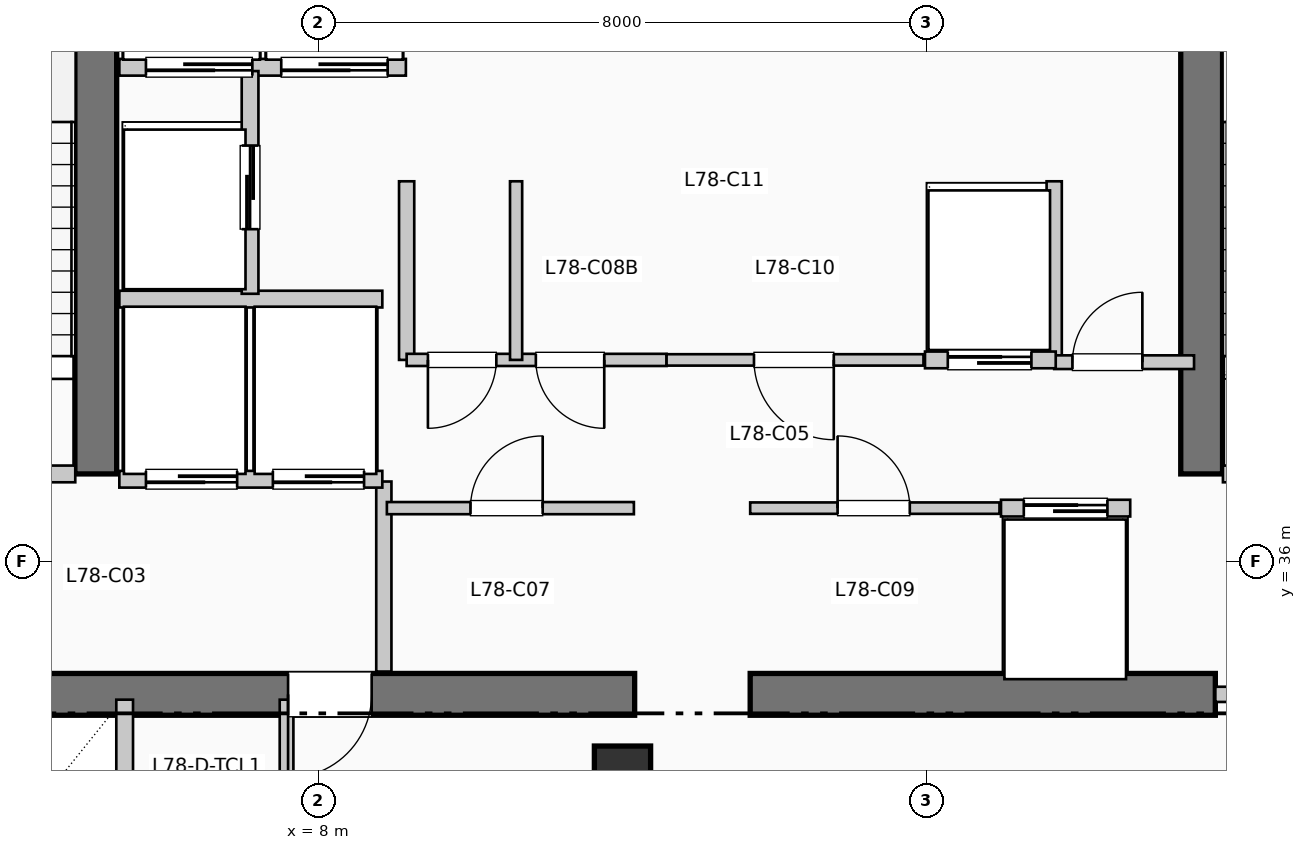
"""IFC4 building model, lengths in metres.
Left out: names, types, materials, properties, quantities, classifications, styles, units other than length and angle.
Written with IfcOpenShell. Run it as: python <this file> out.ifc"""

import sys

from ifc_helpers import new_model, si_unit, direction, frame, frame_2d, origin, origin_2d, place, context, subcontext, project, spatial, rectangle, extrude, element, fill, save


model = new_model("IFC4")
c1 = context("Model", 3, precision=1e-05, world=origin(), true_north=direction((0.0, 1.0)))
c2 = subcontext(c1, "Body", "Model", "MODEL_VIEW")
j1 = project(units=[si_unit("LENGTHUNIT", "METRE"), si_unit("PLANEANGLEUNIT", "RADIAN")], contexts=[c1])
p1 = place(None, origin())
s1 = spatial("IfcSite", under=j1, at=p1, CompositionType="ELEMENT")
p2 = place(p1, origin())
s2 = spatial("IfcBuilding", under=s1, at=p2, CompositionType="ELEMENT")
p3 = place(p2, frame((0.0, 0.0, 319.77)))
s3 = spatial("IfcBuildingStorey", under=s2, at=p3, CompositionType="ELEMENT", Elevation=319.77)
p4 = place(p3, frame((1.45, 34.25, 0.0), z_axis=(0.0, 0.0, 1.0), x_axis=(1.0, 0.0, 0.0)))
e1 = element("IfcWall", 1, at=p4, inside=s3, PredefinedType="SHEAR", context=c2, shape_type="SweptSolid", body=[
    extrude(rectangle(XDim=10.71, YDim=0.55, at=frame_2d((5.355, 0.0))), origin(), (0.0, 0.0, 1.0), 3.96),
])
p5 = place(p4, frame((7.25, 0.0, 0.0), z_axis=(0.0, 0.0, 1.0), x_axis=(-1.0, 0.0, 0.0)))
e2 = element("IfcOpeningElement", 2, at=p5, cuts=e1, PredefinedType="OPENING", context=c2, shape_type="SweptSolid", body=[
    extrude(rectangle(XDim=1.1, YDim=2.15, at=frame_2d((0.55, 1.075))), frame((0.0, 0.285, 0.0), z_axis=(0.0, -1.0, 0.0), x_axis=(1.0, 0.0, 0.0)), (0.0, 0.0, 1.0), 0.57),
])
p6 = place(p3, frame((13.68, 34.25, 0.0), z_axis=(0.0, 0.0, 1.0), x_axis=(1.0, 0.0, 0.0)))
e3 = element("IfcWall", 3, at=p6, inside=s3, PredefinedType="SHEAR", context=c2, shape_type="SweptSolid", body=[
    extrude(rectangle(XDim=6.12, YDim=0.55, at=frame_2d((3.06, 0.0))), origin(), (0.0, 0.0, 1.0), 3.96),
])
for number, where, z_axis, x_axis in (
    (4, (5.07, 37.15, 0.0), (0.0, 0.0, 1.0), (0.0, 1.0, 0.0)),
    (5, (19.62, 37.15, 0.0), (0.0, 0.0, 1.0), (0.0, 1.0, 0.0)),
):
    element("IfcWall", number, at=place(p3, frame(where, z_axis=z_axis, x_axis=x_axis)), inside=s3, PredefinedType="SHEAR", context=c2, shape_type="SweptSolid", body=[
        extrude(rectangle(XDim=7.89, YDim=0.55, at=frame_2d((3.945, 0.0))), origin(), (0.0, 0.0, 1.0), 3.96),
    ])
p7 = place(p3, frame((12.0, 33.2, 0.0), z_axis=(0.0, 0.0, 1.0), x_axis=(1.0, 0.0, 0.0)))
e6 = element("IfcColumn", 6, at=p7, inside=s3, PredefinedType="COLUMN", context=c2, shape_type="SweptSolid", body=[
    extrude(rectangle(XDim=0.74, YDim=0.74, at=origin_2d()), origin(), (0.0, 0.0, 1.0), 3.96),
])
p8 = place(p3, frame((1.65, 37.15, 0.0), z_axis=(0.0, 0.0, 1.0), x_axis=(1.0, 0.0, 0.0)))
e7 = element("IfcWall", 7, at=p8, inside=s3, PredefinedType="PARTITIONING", context=c2, shape_type="SweptSolid", body=[
    extrude(rectangle(XDim=3.15, YDim=0.22, at=frame_2d((1.575, 0.0))), origin(), (0.0, 0.0, 1.0), 3.74),
])
p9 = place(p8, frame((2.05, 0.0, 0.0), z_axis=(0.0, 0.0, 1.0), x_axis=(-1.0, 0.0, 0.0)))
e8 = element("IfcOpeningElement", 8, at=p9, cuts=e7, PredefinedType="OPENING", context=c2, shape_type="SweptSolid", body=[
    extrude(rectangle(XDim=1.05, YDim=2.15, at=frame_2d((0.525, 1.075))), frame((0.0, 0.12, 0.0), z_axis=(0.0, -1.0, 0.0), x_axis=(1.0, 0.0, 0.0)), (0.0, 0.0, 1.0), 0.24),
])
p10 = place(p3, frame((8.86, 34.55, 0.0), z_axis=(0.0, 0.0, 1.0), x_axis=(0.0, 1.0, 0.0)))
e9 = element("IfcWall", 9, at=p10, inside=s3, PredefinedType="PARTITIONING", context=c2, shape_type="SweptSolid", body=[
    extrude(rectangle(XDim=2.5, YDim=0.2, at=frame_2d((1.25, 0.0))), origin(), (0.0, 0.0, 1.0), 3.74),
])
p11 = place(p3, frame((19.9, 37.15, 0.0), z_axis=(0.0, 0.0, 1.0), x_axis=(1.0, 0.0, 0.0)))
e10 = element("IfcWall", 10, at=p11, inside=s3, PredefinedType="PARTITIONING", context=c2, shape_type="SweptSolid", body=[
    extrude(rectangle(XDim=3.15, YDim=0.22, at=frame_2d((1.575, 0.0))), origin(), (0.0, 0.0, 1.0), 3.74),
])
p12 = place(p11, frame((2.05, 0.0, 0.0), z_axis=(0.0, 0.0, 1.0), x_axis=(-1.0, 0.0, 0.0)))
e11 = element("IfcOpeningElement", 11, at=p12, cuts=e10, PredefinedType="OPENING", context=c2, shape_type="SweptSolid", body=[
    extrude(rectangle(XDim=1.05, YDim=2.15, at=frame_2d((0.525, 1.075))), frame((0.0, 0.12, 0.0), z_axis=(0.0, -1.0, 0.0), x_axis=(1.0, 0.0, 0.0)), (0.0, 0.0, 1.0), 0.24),
])
p13 = place(p3, frame((19.8, 34.25, 0.0), z_axis=(0.0, 0.0, 1.0), x_axis=(1.0, 0.0, 0.0)))
e12 = element("IfcWall", 12, at=p13, inside=s3, PredefinedType="PARTITIONING", context=c2, shape_type="SweptSolid", body=[
    extrude(rectangle(XDim=3.25, YDim=0.2, at=frame_2d((1.625, 0.0))), origin(), (0.0, 0.0, 1.0), 3.74),
])
p14 = place(p13, frame((2.15, 0.0, 0.0), z_axis=(0.0, 0.0, 1.0), x_axis=(-1.0, 0.0, 0.0)))
e13 = element("IfcOpeningElement", 13, at=p14, cuts=e12, PredefinedType="OPENING", context=c2, shape_type="SweptSolid", body=[
    extrude(rectangle(XDim=1.1, YDim=2.15, at=frame_2d((0.55, 1.075))), frame((0.0, 0.11, 0.0), z_axis=(0.0, -1.0, 0.0), x_axis=(1.0, 0.0, 0.0)), (0.0, 0.0, 1.0), 0.22),
])
p15 = place(p3, frame((5.38, 37.08, 0.0), z_axis=(0.0, 0.0, 1.0), x_axis=(1.0, 0.0, 0.0)))
e14 = element("IfcWall", 14, at=p15, inside=s3, PredefinedType="PARTITIONING", context=c2, shape_type="SweptSolid", body=[
    extrude(rectangle(XDim=3.46, YDim=0.22, at=frame_2d((1.73, 0.0))), origin(), (0.0, 0.0, 1.0), 3.74),
])
p16 = place(p15, frame((1.55, 0.0, 0.0), z_axis=(0.0, 0.0, 1.0), x_axis=(-1.0, 0.0, 0.0)))
e15 = element("IfcOpeningElement", 15, at=p16, cuts=e14, PredefinedType="OPENING", context=c2, shape_type="SweptSolid", body=[
    extrude(rectangle(XDim=1.2, YDim=2.2, at=frame_2d((0.6, 1.1))), frame((0.0, 0.12, 0.0), z_axis=(0.0, -1.0, 0.0), x_axis=(1.0, 0.0, 0.0)), (0.0, 0.0, 1.0), 0.24),
])
p17 = place(p15, frame((3.22, 0.0, 0.0), z_axis=(0.0, 0.0, 1.0), x_axis=(-1.0, 0.0, 0.0)))
e16 = element("IfcOpeningElement", 16, at=p17, cuts=e14, PredefinedType="OPENING", context=c2, shape_type="SweptSolid", body=[
    extrude(rectangle(XDim=1.2, YDim=2.2, at=frame_2d((0.6, 1.1))), frame((0.0, 0.12, 0.0), z_axis=(0.0, -1.0, 0.0), x_axis=(1.0, 0.0, 0.0)), (0.0, 0.0, 1.0), 0.24),
])
p18 = place(p3, frame((5.38, 39.45, 0.0), z_axis=(0.0, 0.0, 1.0), x_axis=(1.0, 0.0, 0.0)))
e17 = element("IfcWall", 17, at=p18, inside=s3, PredefinedType="PARTITIONING", context=c2, shape_type="SweptSolid", body=[
    extrude(rectangle(XDim=3.46, YDim=0.22, at=frame_2d((1.73, 0.0))), origin(), (0.0, 0.0, 1.0), 3.74),
])
p19 = place(p3, frame((5.38, 42.5, 0.0), z_axis=(0.0, 0.0, 1.0), x_axis=(1.0, 0.0, 0.0)))
e18 = element("IfcWall", 18, at=p19, inside=s3, PredefinedType="PARTITIONING", context=c2, shape_type="SweptSolid", body=[
    extrude(rectangle(XDim=3.77, YDim=0.22, at=frame_2d((1.885, 0.0))), origin(), (0.0, 0.0, 1.0), 3.74),
])
p20 = place(p19, frame((1.75, 0.0, 0.0), z_axis=(0.0, 0.0, 1.0), x_axis=(-1.0, 0.0, 0.0)))
e19 = element("IfcOpeningElement", 19, at=p20, cuts=e18, PredefinedType="OPENING", context=c2, shape_type="SweptSolid", body=[
    extrude(rectangle(XDim=1.4, YDim=2.2, at=frame_2d((0.7, 1.1))), frame((0.0, 0.12, 0.0), z_axis=(0.0, -1.0, 0.0), x_axis=(1.0, 0.0, 0.0)), (0.0, 0.0, 1.0), 0.24),
])
p21 = place(p19, frame((3.53, 0.0, 0.0), z_axis=(0.0, 0.0, 1.0), x_axis=(-1.0, 0.0, 0.0)))
e20 = element("IfcOpeningElement", 20, at=p21, cuts=e18, PredefinedType="OPENING", context=c2, shape_type="SweptSolid", body=[
    extrude(rectangle(XDim=1.4, YDim=2.2, at=frame_2d((0.7, 1.1))), frame((0.0, 0.12, 0.0), z_axis=(0.0, -1.0, 0.0), x_axis=(1.0, 0.0, 0.0)), (0.0, 0.0, 1.0), 0.24),
])
p22 = place(p3, frame((7.1, 39.52, 0.0), z_axis=(0.0, 0.0, 1.0), x_axis=(0.0, 1.0, 0.0)))
e21 = element("IfcWall", 21, at=p22, inside=s3, PredefinedType="PARTITIONING", context=c2, shape_type="SweptSolid", body=[
    extrude(rectangle(XDim=2.93, YDim=0.22, at=frame_2d((1.465, 0.0))), origin(), (0.0, 0.0, 1.0), 3.74),
])
p23 = place(p22, frame((0.85, 0.0, 0.0)))
e22 = element("IfcOpeningElement", 22, at=p23, cuts=e21, PredefinedType="OPENING", context=c2, shape_type="SweptSolid", body=[
    extrude(rectangle(XDim=1.1, YDim=2.2, at=frame_2d((0.55, 1.1))), frame((0.0, 0.12, 0.0), z_axis=(0.0, -1.0, 0.0), x_axis=(1.0, 0.0, 0.0)), (0.0, 0.0, 1.0), 0.24),
])
p24 = place(p3, frame((5.45, 31.8, 0.0), z_axis=(0.0, 0.0, 1.0), x_axis=(0.0, 1.0, 0.0)))
e23 = element("IfcWall", 23, at=p24, inside=s3, PredefinedType="PARTITIONING", context=c2, shape_type="SweptSolid", body=[
    extrude(rectangle(XDim=2.38, YDim=0.22, at=frame_2d((1.19, 0.0))), origin(), (0.0, 0.0, 1.0), 3.74),
])
for number, where, z_axis, x_axis in (
    (24, (9.16, 38.65, 0.0), (0.0, 0.0, 1.0), (0.0, 1.0, 0.0)),
    (25, (17.68, 38.65, 0.0), (0.0, 0.0, 1.0), (0.0, 1.0, 0.0)),
):
    element("IfcWall", number, at=place(p3, frame(where, z_axis=z_axis, x_axis=x_axis)), inside=s3, PredefinedType="PARTITIONING", context=c2, shape_type="SweptSolid", body=[
        extrude(rectangle(XDim=2.35, YDim=0.2, at=frame_2d((1.175, 0.0))), origin(), (0.0, 0.0, 1.0), 3.74),
    ])
p25 = place(p3, frame((17.68, 38.62, 0.0), z_axis=(0.0, 0.0, 1.0), x_axis=(1.0, 0.0, 0.0)))
e26 = element("IfcWall", 26, at=p25, inside=s3, PredefinedType="PARTITIONING", context=c2, shape_type="SweptSolid", body=[
    extrude(rectangle(XDim=1.84, YDim=0.18, at=frame_2d((0.92, 0.0))), origin(), (0.0, 0.0, 1.0), 3.74),
])
p26 = place(p25, frame((0.24, 0.0, 0.0)))
e27 = element("IfcOpeningElement", 27, at=p26, cuts=e26, PredefinedType="OPENING", context=c2, shape_type="SweptSolid", body=[
    extrude(rectangle(XDim=0.92, YDim=2.1, at=frame_2d((0.46, 1.05))), frame((0.0, 0.1, 0.0), z_axis=(0.0, -1.0, 0.0), x_axis=(1.0, 0.0, 0.0)), (0.0, 0.0, 1.0), 0.2),
])
p27 = place(p3, frame((7.58, 31.82, 0.0), z_axis=(0.0, 0.0, 1.0), x_axis=(0.0, 1.0, 0.0)))
e28 = element("IfcWall", 28, at=p27, inside=s3, PredefinedType="PLUMBINGWALL", context=c2, shape_type="SweptSolid", body=[
    extrude(rectangle(XDim=2.36, YDim=0.18, at=frame_2d((1.18, 0.0))), origin(), (0.0, 0.0, 1.0), 3.74),
])
p28 = place(p3, frame((8.9, 36.7, 0.0), z_axis=(0.0, 0.0, 1.0), x_axis=(1.0, 0.0, 0.0)))
e29 = element("IfcWall", 29, at=p28, inside=s3, PredefinedType="PARTITIONING", context=c2, shape_type="SweptSolid", body=[
    extrude(rectangle(XDim=3.25, YDim=0.16, at=frame_2d((1.625, 0.0))), origin(), (0.0, 0.0, 1.0), 3.74),
])
p29 = place(p28, frame((1.1, 0.0, 0.0)))
e30 = element("IfcOpeningElement", 30, at=p29, cuts=e29, PredefinedType="OPENING", context=c2, shape_type="SweptSolid", body=[
    extrude(rectangle(XDim=0.95, YDim=2.15, at=frame_2d((0.475, 1.075))), frame((0.0, 0.09, 0.0), z_axis=(0.0, -1.0, 0.0), x_axis=(1.0, 0.0, 0.0)), (0.0, 0.0, 1.0), 0.18),
])
p30 = place(p3, frame((9.16, 38.65, 0.0), z_axis=(0.0, 0.0, 1.0), x_axis=(1.0, 0.0, 0.0)))
e31 = element("IfcWall", 31, at=p30, inside=s3, PredefinedType="PARTITIONING", context=c2, shape_type="SweptSolid", body=[
    extrude(rectangle(XDim=3.42, YDim=0.16, at=frame_2d((1.71, 0.0))), origin(), (0.0, 0.0, 1.0), 3.74),
])
p31 = place(p30, frame((1.18, 0.0, 0.0), z_axis=(0.0, 0.0, 1.0), x_axis=(-1.0, 0.0, 0.0)))
e32 = element("IfcOpeningElement", 32, at=p31, cuts=e31, PredefinedType="OPENING", context=c2, shape_type="SweptSolid", body=[
    extrude(rectangle(XDim=0.9, YDim=2.15, at=frame_2d((0.45, 1.075))), frame((0.0, 0.09, 0.0), z_axis=(0.0, -1.0, 0.0), x_axis=(1.0, 0.0, 0.0)), (0.0, 0.0, 1.0), 0.18),
])
p32 = place(p30, frame((2.6, 0.0, 0.0), z_axis=(0.0, 0.0, 1.0), x_axis=(-1.0, 0.0, 0.0)))
e33 = element("IfcOpeningElement", 33, at=p32, cuts=e31, PredefinedType="OPENING", context=c2, shape_type="SweptSolid", body=[
    extrude(rectangle(XDim=0.9, YDim=2.15, at=frame_2d((0.45, 1.075))), frame((0.0, 0.09, 0.0), z_axis=(0.0, -1.0, 0.0), x_axis=(1.0, 0.0, 0.0)), (0.0, 0.0, 1.0), 0.18),
])
p33 = place(p3, frame((10.6, 38.65, 0.0), z_axis=(0.0, 0.0, 1.0), x_axis=(0.0, 1.0, 0.0)))
e34 = element("IfcWall", 34, at=p33, inside=s3, PredefinedType="PARTITIONING", context=c2, shape_type="SweptSolid", body=[
    extrude(rectangle(XDim=2.35, YDim=0.16, at=frame_2d((1.175, 0.0))), origin(), (0.0, 0.0, 1.0), 3.74),
])
p34 = place(p3, frame((13.68, 36.7, 0.0), z_axis=(0.0, 0.0, 1.0), x_axis=(1.0, 0.0, 0.0)))
e35 = element("IfcWall", 35, at=p34, inside=s3, PredefinedType="PARTITIONING", context=c2, shape_type="SweptSolid", body=[
    extrude(rectangle(XDim=3.28, YDim=0.15, at=frame_2d((1.64, 0.0))), origin(), (0.0, 0.0, 1.0), 3.74),
])
p35 = place(p34, frame((1.15, 0.0, 0.0)))
e36 = element("IfcOpeningElement", 36, at=p35, cuts=e35, PredefinedType="OPENING", context=c2, shape_type="SweptSolid", body=[
    extrude(rectangle(XDim=0.95, YDim=2.15, at=frame_2d((0.475, 1.075))), frame((0.0, 0.085, 0.0), z_axis=(0.0, -1.0, 0.0), x_axis=(1.0, 0.0, 0.0)), (0.0, 0.0, 1.0), 0.17),
])
p36 = place(p3, frame((12.58, 38.65, 0.0), z_axis=(0.0, 0.0, 1.0), x_axis=(1.0, 0.0, 0.0)))
e37 = element("IfcWall", 37, at=p36, inside=s3, PredefinedType="PARTITIONING", context=c2, shape_type="SweptSolid", body=[
    extrude(rectangle(XDim=3.38, YDim=0.15, at=frame_2d((1.69, 0.0))), origin(), (0.0, 0.0, 1.0), 3.74),
])
p37 = place(p36, frame((2.2, 0.0, 0.0), z_axis=(0.0, 0.0, 1.0), x_axis=(-1.0, 0.0, 0.0)))
e38 = element("IfcOpeningElement", 38, at=p37, cuts=e37, PredefinedType="OPENING", context=c2, shape_type="SweptSolid", body=[
    extrude(rectangle(XDim=1.05, YDim=2.15, at=frame_2d((0.525, 1.075))), frame((0.0, 0.085, 0.0), z_axis=(0.0, -1.0, 0.0), x_axis=(1.0, 0.0, 0.0)), (0.0, 0.0, 1.0), 0.17),
])
p38 = place(p3, frame((16.98, 36.7, 0.0), z_axis=(0.0, 0.0, 1.0), x_axis=(1.0, 0.0, 0.0)))
e39 = element("IfcWall", 39, at=p38, inside=s3, PredefinedType="PARTITIONING", context=c2, shape_type="SweptSolid", body=[
    extrude(rectangle(XDim=1.7, YDim=0.22, at=frame_2d((0.85, 0.0))), origin(), (0.0, 0.0, 1.0), 3.74),
])
p39 = place(p38, frame((0.3, 0.0, 0.0)))
e40 = element("IfcOpeningElement", 40, at=p39, cuts=e39, PredefinedType="OPENING", context=c2, shape_type="SweptSolid", body=[
    extrude(rectangle(XDim=1.1, YDim=2.2, at=frame_2d((0.55, 1.1))), frame((0.0, 0.12, 0.0), z_axis=(0.0, -1.0, 0.0), x_axis=(1.0, 0.0, 0.0)), (0.0, 0.0, 1.0), 0.24),
])
p40 = place(p3, frame((15.98, 38.65, 0.0), z_axis=(0.0, 0.0, 1.0), x_axis=(1.0, 0.0, 0.0)))
e41 = element("IfcWall", 41, at=p40, inside=s3, PredefinedType="PARTITIONING", context=c2, shape_type="SweptSolid", body=[
    extrude(rectangle(XDim=1.72, YDim=0.22, at=frame_2d((0.86, 0.0))), origin(), (0.0, 0.0, 1.0), 3.74),
])
p41 = place(p40, frame((0.3, 0.0, 0.0)))
e42 = element("IfcOpeningElement", 42, at=p41, cuts=e41, PredefinedType="OPENING", context=c2, shape_type="SweptSolid", body=[
    extrude(rectangle(XDim=1.1, YDim=2.2, at=frame_2d((0.55, 1.1))), frame((0.0, 0.12, 0.0), z_axis=(0.0, -1.0, 0.0), x_axis=(1.0, 0.0, 0.0)), (0.0, 0.0, 1.0), 0.24),
])
p42 = place(p5, origin())
e43 = element("IfcDoor", 43, at=p42, inside=s3, OperationType="SINGLE_SWING_LEFT", PredefinedType="DOOR", context=c2, shape_type="SweptSolid", body=[
    extrude(rectangle(XDim=1.1, YDim=2.15, at=frame_2d((0.55, 1.075))), frame((0.0, 0.025, 0.0), z_axis=(0.0, -1.0, 0.0), x_axis=(1.0, 0.0, 0.0)), (0.0, 0.0, 1.0), 0.05),
])
fill(e2, e43)
p43 = place(p16, origin())
e44 = element("IfcDoor", 44, at=p43, inside=s3, OperationType="SLIDING_TO_RIGHT", PredefinedType="DOOR", context=c2, shape_type="SweptSolid", body=[
    extrude(rectangle(XDim=1.2, YDim=2.2, at=frame_2d((0.6, 1.1))), frame((0.0, 0.025, 0.0), z_axis=(0.0, -1.0, 0.0), x_axis=(1.0, 0.0, 0.0)), (0.0, 0.0, 1.0), 0.05),
])
fill(e15, e44)
p44 = place(p17, origin())
e45 = element("IfcDoor", 45, at=p44, inside=s3, OperationType="SLIDING_TO_RIGHT", PredefinedType="DOOR", context=c2, shape_type="SweptSolid", body=[
    extrude(rectangle(XDim=1.2, YDim=2.2, at=frame_2d((0.6, 1.1))), frame((0.0, 0.025, 0.0), z_axis=(0.0, -1.0, 0.0), x_axis=(1.0, 0.0, 0.0)), (0.0, 0.0, 1.0), 0.05),
])
fill(e16, e45)
p45 = place(p20, origin())
e46 = element("IfcDoor", 46, at=p45, inside=s3, OperationType="SLIDING_TO_LEFT", PredefinedType="DOOR", context=c2, shape_type="SweptSolid", body=[
    extrude(rectangle(XDim=1.4, YDim=2.2, at=frame_2d((0.7, 1.1))), frame((0.0, 0.025, 0.0), z_axis=(0.0, -1.0, 0.0), x_axis=(1.0, 0.0, 0.0)), (0.0, 0.0, 1.0), 0.05),
])
fill(e19, e46)
p46 = place(p21, origin())
e47 = element("IfcDoor", 47, at=p46, inside=s3, OperationType="SLIDING_TO_LEFT", PredefinedType="DOOR", context=c2, shape_type="SweptSolid", body=[
    extrude(rectangle(XDim=1.4, YDim=2.2, at=frame_2d((0.7, 1.1))), frame((0.0, 0.025, 0.0), z_axis=(0.0, -1.0, 0.0), x_axis=(1.0, 0.0, 0.0)), (0.0, 0.0, 1.0), 0.05),
])
fill(e20, e47)
p47 = place(p23, origin())
e48 = element("IfcDoor", 48, at=p47, inside=s3, OperationType="SLIDING_TO_LEFT", PredefinedType="DOOR", context=c2, shape_type="SweptSolid", body=[
    extrude(rectangle(XDim=1.1, YDim=2.2, at=frame_2d((0.55, 1.1))), frame((0.0, 0.025, 0.0), z_axis=(0.0, -1.0, 0.0), x_axis=(1.0, 0.0, 0.0)), (0.0, 0.0, 1.0), 0.05),
])
fill(e22, e48)
p48 = place(p26, origin())
e49 = element("IfcDoor", 49, at=p48, inside=s3, OperationType="SINGLE_SWING_RIGHT", PredefinedType="DOOR", context=c2, shape_type="SweptSolid", body=[
    extrude(rectangle(XDim=0.92, YDim=2.1, at=frame_2d((0.46, 1.05))), frame((0.0, 0.025, 0.0), z_axis=(0.0, -1.0, 0.0), x_axis=(1.0, 0.0, 0.0)), (0.0, 0.0, 1.0), 0.05),
])
fill(e27, e49)
p49 = place(p29, origin())
e50 = element("IfcDoor", 50, at=p49, inside=s3, OperationType="SINGLE_SWING_RIGHT", PredefinedType="DOOR", context=c2, shape_type="SweptSolid", body=[
    extrude(rectangle(XDim=0.95, YDim=2.15, at=frame_2d((0.475, 1.075))), frame((0.0, 0.025, 0.0), z_axis=(0.0, -1.0, 0.0), x_axis=(1.0, 0.0, 0.0)), (0.0, 0.0, 1.0), 0.05),
])
fill(e30, e50)
p50 = place(p31, origin())
e51 = element("IfcDoor", 51, at=p50, inside=s3, OperationType="SINGLE_SWING_LEFT", PredefinedType="DOOR", context=c2, shape_type="SweptSolid", body=[
    extrude(rectangle(XDim=0.9, YDim=2.15, at=frame_2d((0.45, 1.075))), frame((0.0, 0.025, 0.0), z_axis=(0.0, -1.0, 0.0), x_axis=(1.0, 0.0, 0.0)), (0.0, 0.0, 1.0), 0.05),
])
fill(e32, e51)
p51 = place(p32, origin())
e52 = element("IfcDoor", 52, at=p51, inside=s3, OperationType="SINGLE_SWING_RIGHT", PredefinedType="DOOR", context=c2, shape_type="SweptSolid", body=[
    extrude(rectangle(XDim=0.9, YDim=2.15, at=frame_2d((0.45, 1.075))), frame((0.0, 0.025, 0.0), z_axis=(0.0, -1.0, 0.0), x_axis=(1.0, 0.0, 0.0)), (0.0, 0.0, 1.0), 0.05),
])
fill(e33, e52)
p52 = place(p35, origin())
e53 = element("IfcDoor", 53, at=p52, inside=s3, OperationType="SINGLE_SWING_LEFT", PredefinedType="DOOR", context=c2, shape_type="SweptSolid", body=[
    extrude(rectangle(XDim=0.95, YDim=2.15, at=frame_2d((0.475, 1.075))), frame((0.0, 0.025, 0.0), z_axis=(0.0, -1.0, 0.0), x_axis=(1.0, 0.0, 0.0)), (0.0, 0.0, 1.0), 0.05),
])
fill(e36, e53)
p53 = place(p37, origin())
e54 = element("IfcDoor", 54, at=p53, inside=s3, OperationType="SINGLE_SWING_RIGHT", PredefinedType="DOOR", context=c2, shape_type="SweptSolid", body=[
    extrude(rectangle(XDim=1.05, YDim=2.15, at=frame_2d((0.525, 1.075))), frame((0.0, 0.025, 0.0), z_axis=(0.0, -1.0, 0.0), x_axis=(1.0, 0.0, 0.0)), (0.0, 0.0, 1.0), 0.05),
])
fill(e38, e54)
p54 = place(p39, origin())
e55 = element("IfcDoor", 55, at=p54, inside=s3, OperationType="SLIDING_TO_LEFT", PredefinedType="DOOR", context=c2, shape_type="SweptSolid", body=[
    extrude(rectangle(XDim=1.1, YDim=2.2, at=frame_2d((0.55, 1.1))), frame((0.0, 0.025, 0.0), z_axis=(0.0, -1.0, 0.0), x_axis=(1.0, 0.0, 0.0)), (0.0, 0.0, 1.0), 0.05),
])
fill(e40, e55)
p55 = place(p41, origin())
e56 = element("IfcDoor", 56, at=p55, inside=s3, OperationType="SLIDING_TO_LEFT", PredefinedType="DOOR", context=c2, shape_type="SweptSolid", body=[
    extrude(rectangle(XDim=1.1, YDim=2.2, at=frame_2d((0.55, 1.1))), frame((0.0, 0.025, 0.0), z_axis=(0.0, -1.0, 0.0), x_axis=(1.0, 0.0, 0.0)), (0.0, 0.0, 1.0), 0.05),
])
fill(e42, e56)
save(model, sys.argv[1])
